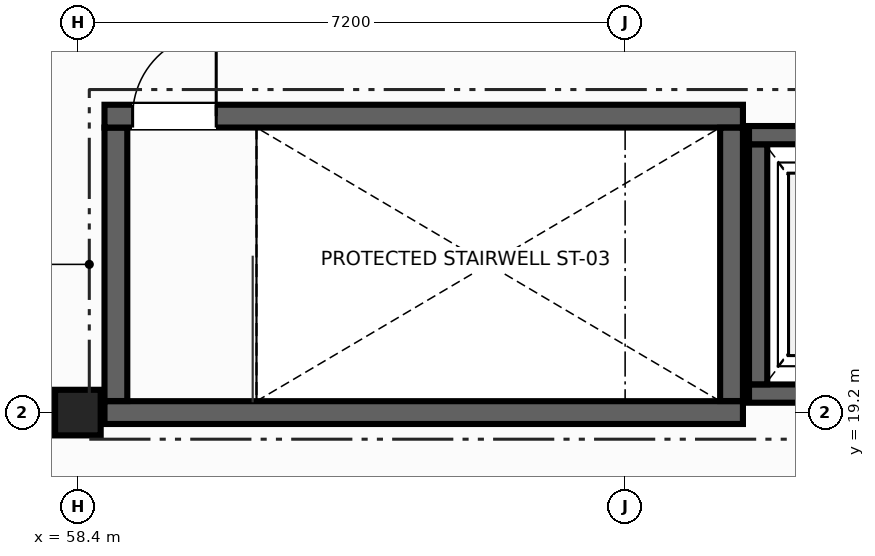
"""IFC4 building model, lengths in metres.
Left out: names, types, materials, properties, quantities, classifications, styles, units other than length and angle.
Written with IfcOpenShell. Run it as: python <this file> out.ifc"""

import sys

from ifc_helpers import new_model, si_unit, direction, frame, frame_2d, origin, origin_2d, place, context, subcontext, project, spatial, rectangle, extrude, element, fill, save


model = new_model("IFC4")
c1 = context("Model", 3, precision=1e-05, world=origin(), true_north=direction((0.0, 1.0)))
c2 = subcontext(c1, "Body", "Model", "MODEL_VIEW")
j1 = project(units=[si_unit("LENGTHUNIT", "METRE"), si_unit("PLANEANGLEUNIT", "RADIAN")], contexts=[c1])
p1 = place(None, origin())
s1 = spatial("IfcSite", under=j1, at=p1, CompositionType="ELEMENT")
p2 = place(p1, origin())
s2 = spatial("IfcBuilding", under=s1, at=p2, CompositionType="ELEMENT")
p3 = place(p2, frame((0.0, 0.0, 14.4)))
s3 = spatial("IfcBuildingStorey", under=s2, at=p3, CompositionType="ELEMENT", Elevation=14.4)
p4 = place(p3, frame((58.4, 19.2, 0.0), z_axis=(0.0, 0.0, 1.0), x_axis=(0.0, 1.0, 0.0)))
e1 = element("IfcColumn", 1, at=p4, inside=s3, PredefinedType="COLUMN", context=c2, shape_type="SweptSolid", body=[
    extrude(rectangle(XDim=0.6, YDim=0.6, at=origin_2d()), origin(), (0.0, 0.0, 1.0), 4.28),
])
p5 = place(p3, frame((67.15, 19.2, 0.0), z_axis=(0.0, 0.0, 1.0), x_axis=(-1.0, 0.0, 0.0)))
e2 = element("IfcWall", 2, at=p5, inside=s3, PredefinedType="SHEAR", context=c2, shape_type="SweptSolid", body=[
    extrude(rectangle(XDim=8.4, YDim=0.3, at=frame_2d((4.2, 0.0))), origin(), (0.0, 0.0, 1.0), 4.28),
])
p6 = place(p3, frame((58.9, 19.352, 0.0), z_axis=(0.0, 0.0, 1.0), x_axis=(0.0, 1.0, 0.0)))
e3 = element("IfcWall", 3, at=p6, inside=s3, PredefinedType="SHEAR", context=c2, shape_type="SweptSolid", body=[
    extrude(rectangle(XDim=3.598, YDim=0.3, at=frame_2d((1.799, 0.0))), origin(), (0.0, 0.0, 1.0), 4.28),
])
p7 = place(p3, frame((58.75, 23.1, 0.0), z_axis=(0.0, 0.0, 1.0), x_axis=(1.0, 0.0, 0.0)))
e4 = element("IfcWall", 4, at=p7, inside=s3, PredefinedType="SHEAR", context=c2, shape_type="SweptSolid", body=[
    extrude(rectangle(XDim=8.4, YDim=0.3, at=frame_2d((4.2, 0.0))), origin(), (0.0, 0.0, 1.0), 4.28),
])
p8 = place(p7, frame((0.37, 0.0, 0.0)))
e5 = element("IfcOpeningElement", 5, at=p8, cuts=e4, PredefinedType="OPENING", context=c2, shape_type="SweptSolid", body=[
    extrude(rectangle(XDim=1.1, YDim=2.15, at=frame_2d((0.55, 1.075))), frame((0.0, 0.16, 0.0), z_axis=(0.0, -1.0, 0.0), x_axis=(1.0, 0.0, 0.0)), (0.0, 0.0, 1.0), 0.32),
])
p9 = place(p3, frame((67.0, 22.948, 0.0), z_axis=(0.0, 0.0, 1.0), x_axis=(0.0, -1.0, 0.0)))
e6 = element("IfcWall", 6, at=p9, inside=s3, PredefinedType="SHEAR", context=c2, shape_type="SweptSolid", body=[
    extrude(rectangle(XDim=3.596, YDim=0.3, at=frame_2d((1.798, 0.0))), origin(), (0.0, 0.0, 1.0), 4.28),
])
p10 = place(p3, frame((70.07, 19.45, 0.0), z_axis=(0.0, 0.0, 1.0), x_axis=(-1.0, 0.0, 0.0)))
e7 = element("IfcWall", 7, at=p10, inside=s3, PredefinedType="SHEAR", context=c2, shape_type="SweptSolid", body=[
    extrude(rectangle(XDim=2.84, YDim=0.24, at=frame_2d((1.42, 0.0))), origin(), (0.0, 0.0, 1.0), 4.28),
])
p11 = place(p3, frame((67.35, 19.572, 0.0), z_axis=(0.0, 0.0, 1.0), x_axis=(0.0, 1.0, 0.0)))
e8 = element("IfcWall", 8, at=p11, inside=s3, PredefinedType="SHEAR", context=c2, shape_type="SweptSolid", body=[
    extrude(rectangle(XDim=3.158, YDim=0.24, at=frame_2d((1.579, 0.0))), origin(), (0.0, 0.0, 1.0), 4.28),
])
p12 = place(p3, frame((67.23, 22.85, 0.0), z_axis=(0.0, 0.0, 1.0), x_axis=(1.0, 0.0, 0.0)))
e9 = element("IfcWall", 9, at=p12, inside=s3, PredefinedType="SHEAR", context=c2, shape_type="SweptSolid", body=[
    extrude(rectangle(XDim=2.84, YDim=0.24, at=frame_2d((1.42, 0.0))), origin(), (0.0, 0.0, 1.0), 4.28),
])
p13 = place(p12, frame((0.82, 0.0, 0.0)))
e10 = element("IfcOpeningElement", 10, at=p13, cuts=e9, PredefinedType="OPENING", context=c2, shape_type="SweptSolid", body=[
    extrude(rectangle(XDim=1.2, YDim=2.15, at=frame_2d((0.6, 1.075))), frame((0.0, 0.13, 0.0), z_axis=(0.0, -1.0, 0.0), x_axis=(1.0, 0.0, 0.0)), (0.0, 0.0, 1.0), 0.26),
])
p14 = place(p8, origin())
e11 = element("IfcDoor", 11, at=p14, inside=s3, OperationType="SINGLE_SWING_RIGHT", PredefinedType="DOOR", context=c2, shape_type="SweptSolid", body=[
    extrude(rectangle(XDim=1.1, YDim=2.15, at=frame_2d((0.55, 1.075))), frame((0.0, 0.025, 0.0), z_axis=(0.0, -1.0, 0.0), x_axis=(1.0, 0.0, 0.0)), (0.0, 0.0, 1.0), 0.05),
])
fill(e5, e11)
save(model, sys.argv[1])
